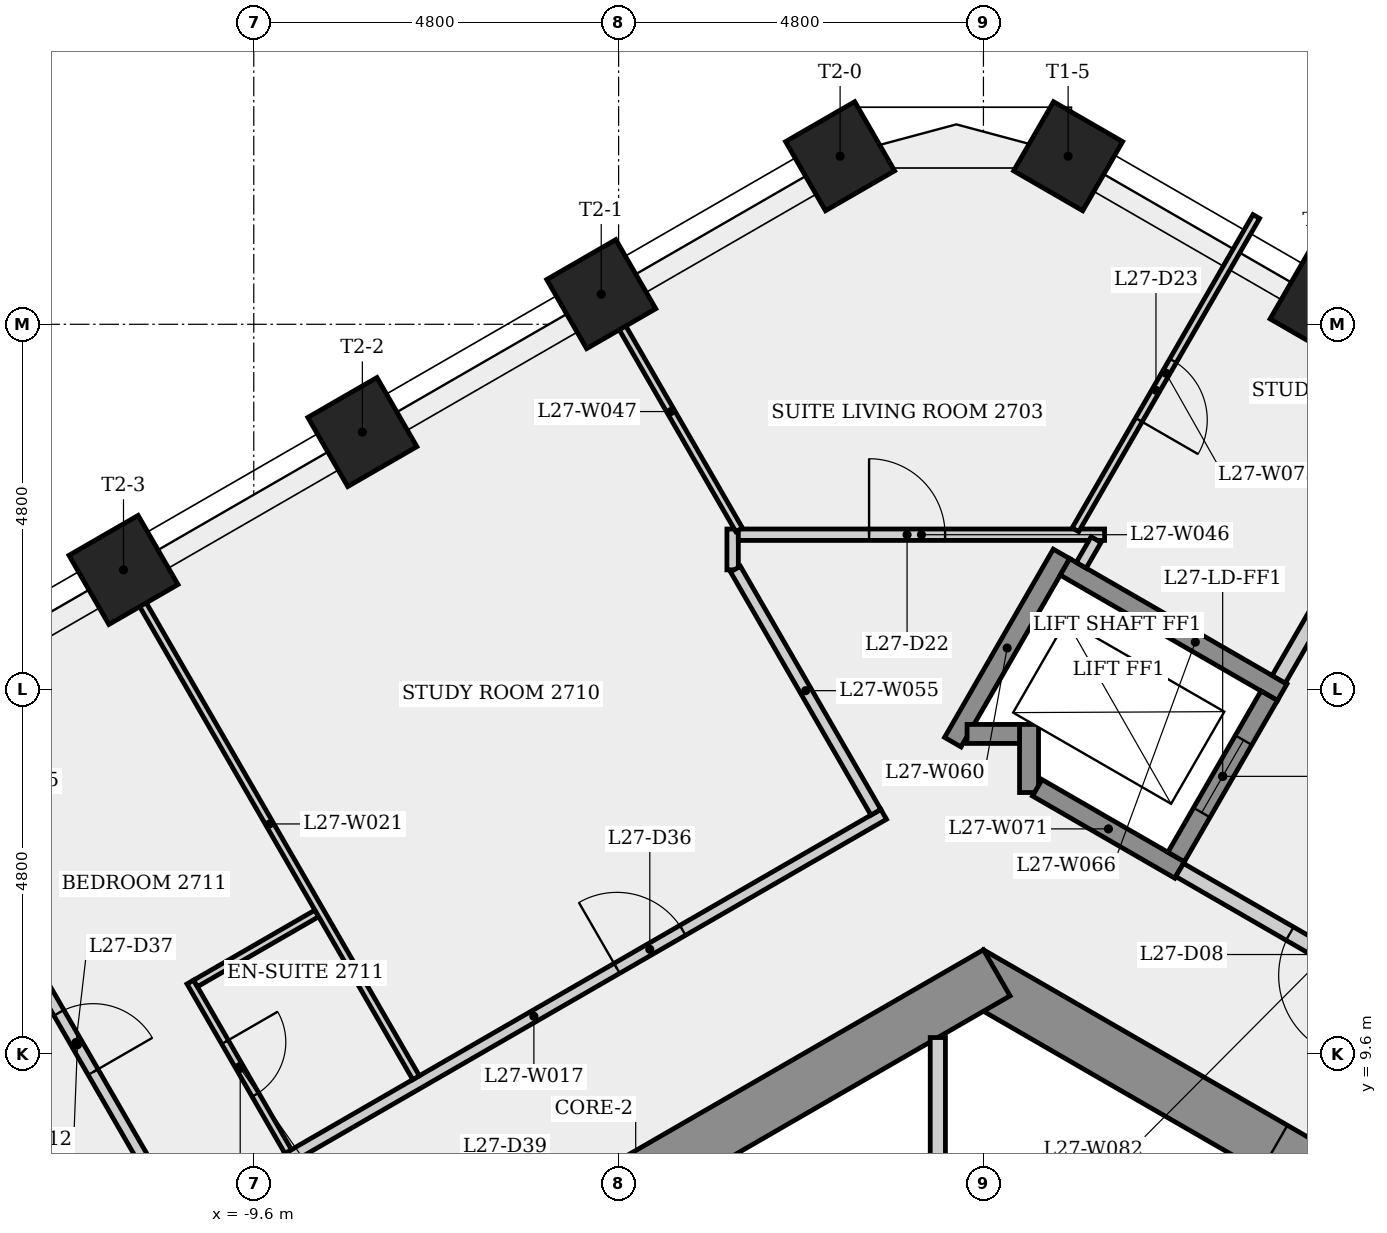
"""IFC4 building model, lengths in metres.
Left out: names, types, materials, properties, quantities, classifications, styles, units other than length and angle.
Written with IfcOpenShell. Run it as: python <this file> out.ifc"""

import sys

from ifc_helpers import new_model, si_unit, direction, frame, frame_2d, origin, origin_2d, place, context, subcontext, project, spatial, rectangle, extrude, element, fill, save


model = new_model("IFC4")
c1 = context("Model", 3, precision=1e-05, world=origin(), true_north=direction((0.0, 1.0)))
c2 = subcontext(c1, "Body", "Model", "MODEL_VIEW")
j1 = project(units=[si_unit("LENGTHUNIT", "METRE"), si_unit("PLANEANGLEUNIT", "RADIAN")], contexts=[c1])
p1 = place(None, origin())
s1 = spatial("IfcSite", under=j1, at=p1, CompositionType="ELEMENT")
p2 = place(p1, origin())
s2 = spatial("IfcBuilding", under=s1, at=p2, CompositionType="ELEMENT")
p3 = place(p2, frame((0.0, 0.0, 103.5)))
s3 = spatial("IfcBuildingStorey", under=s2, at=p3, CompositionType="ELEMENT", Elevation=103.5)
p4 = place(p3, frame((9.325, 5.182, 0.0), z_axis=(0.0, 0.0, 1.0), x_axis=(-0.866023993627, 0.500002442456, 0.0)))
e1 = element("IfcWall", 1, at=p4, inside=s3, PredefinedType="SHEAR", context=c2, shape_type="SweptSolid", body=[
    extrude(rectangle(XDim=10.97, YDim=0.7, at=frame_2d((5.485, 0.0))), origin(), (0.0, 0.0, 1.0), 3.4),
])
p5 = place(p4, frame((5.451, 0.0, 0.0)))
e2 = element("IfcOpeningElement", 2, at=p5, cuts=e1, PredefinedType="OPENING", context=c2, shape_type="SweptSolid", body=[
    extrude(rectangle(XDim=0.9, YDim=2.1, at=frame_2d((0.45, 1.05))), frame((0.0, 0.36, 0.0), z_axis=(0.0, -1.0, 0.0), x_axis=(1.0, 0.0, 0.0)), (0.0, 0.0, 1.0), 0.72),
])
p6 = place(p3, frame((0.175, 10.667, 0.0), z_axis=(0.0, 0.0, 1.0), x_axis=(-0.866023993627, -0.500002442456, 0.0)))
e3 = element("IfcWall", 3, at=p6, inside=s3, PredefinedType="SHEAR", context=c2, shape_type="SweptSolid", body=[
    extrude(rectangle(XDim=10.97, YDim=0.7, at=frame_2d((5.485, 0.0))), origin(), (0.0, 0.0, 1.0), 3.4),
])
p7 = place(p6, frame((7.021, 0.0, 0.0)))
e4 = element("IfcOpeningElement", 4, at=p7, cuts=e3, PredefinedType="OPENING", context=c2, shape_type="SweptSolid", body=[
    extrude(rectangle(XDim=0.9, YDim=2.1, at=frame_2d((0.45, 1.05))), frame((0.0, 0.36, 0.0), z_axis=(0.0, -1.0, 0.0), x_axis=(1.0, 0.0, 0.0)), (0.0, 0.0, 1.0), 0.72),
])
for number, where, z_axis, x_axis in (
    (5, (4.489, 19.463, 0.0), (0.0, 0.0, 1.0), (0.5, 0.866, 0.0)),
    (6, (1.114, 21.411, 0.0), (0.0, 0.0, 1.0), (0.5, 0.866, 0.0)),
    (7, (-1.886, 21.411, 0.0), (0.0, 0.0, 1.0), (-0.5, 0.866, 0.0)),
    (8, (-5.029, 19.597, 0.0), (0.0, 0.0, 1.0), (-0.5, 0.866, 0.0)),
    (9, (-8.171, 17.782, 0.0), (0.0, 0.0, 1.0), (-0.5, 0.866, 0.0)),
    (10, (-11.314, 15.968, 0.0), (0.0, 0.0, 1.0), (-0.5, 0.866, 0.0)),
):
    element("IfcColumn", number, at=place(p3, frame(where, z_axis=z_axis, x_axis=x_axis)), inside=s3, PredefinedType="COLUMN", context=c2, shape_type="SweptSolid", body=[
        extrude(rectangle(XDim=1.05, YDim=1.05, at=origin_2d()), origin(), (0.0, 0.0, 1.0), 3.4),
    ])
p8 = place(p3, frame((-13.296, 12.101, 0.0), z_axis=(0.0, 0.0, 1.0), x_axis=(0.499984873778, -0.866034136737, 0.0)))
e11 = element("IfcWall", 11, at=p8, inside=s3, PredefinedType="PARTITIONING", context=c2, shape_type="SweptSolid", body=[
    extrude(rectangle(XDim=5.503, YDim=0.15, at=frame_2d((2.751, 0.0))), origin(), (0.0, 0.0, 1.0), 3.05),
])
p9 = place(p8, frame((2.264, 0.0, 0.0)))
e12 = element("IfcOpeningElement", 12, at=p9, cuts=e11, PredefinedType="OPENING", context=c2, shape_type="SweptSolid", body=[
    extrude(rectangle(XDim=0.9, YDim=2.1, at=frame_2d((0.45, 1.05))), frame((0.0, 0.085, 0.0), z_axis=(0.0, -1.0, 0.0), x_axis=(1.0, 0.0, 0.0)), (0.0, 0.0, 1.0), 0.17),
])
p10 = place(p3, frame((-10.517, 7.438, 0.0), z_axis=(0.0, 0.0, 1.0), x_axis=(0.866032192358, 0.499988241661, 0.0)))
e13 = element("IfcWall", 13, at=p10, inside=s3, PredefinedType="PARTITIONING", context=c2, shape_type="SweptSolid", body=[
    extrude(rectangle(XDim=10.628, YDim=0.15, at=frame_2d((5.314, 0.0))), origin(), (0.0, 0.0, 1.0), 3.05),
])
p11 = place(p10, frame((6.575, 0.0, 0.0)))
e14 = element("IfcOpeningElement", 14, at=p11, cuts=e13, PredefinedType="OPENING", context=c2, shape_type="SweptSolid", body=[
    extrude(rectangle(XDim=1.0, YDim=2.1, at=frame_2d((0.5, 1.05))), frame((0.0, 0.085, 0.0), z_axis=(0.0, -1.0, 0.0), x_axis=(1.0, 0.0, 0.0)), (0.0, 0.0, 1.0), 0.17),
])
p12 = place(p3, frame((-10.435, 10.545, 0.0), z_axis=(0.0, 0.0, 1.0), x_axis=(0.500034319456, -0.866005588531, 0.0)))
e15 = element("IfcWall", 15, at=p12, inside=s3, PredefinedType="PARTITIONING", context=c2, shape_type="SweptSolid", body=[
    extrude(rectangle(XDim=2.575, YDim=0.1, at=frame_2d((1.288, 0.0))), origin(), (0.0, 0.0, 1.0), 3.05),
])
p13 = place(p12, frame((0.913, 0.0, 0.0)))
e16 = element("IfcOpeningElement", 16, at=p13, cuts=e15, PredefinedType="OPENING", context=c2, shape_type="SweptSolid", body=[
    extrude(rectangle(XDim=0.8, YDim=2.1, at=frame_2d((0.4, 1.05))), frame((0.0, 0.06, 0.0), z_axis=(0.0, -1.0, 0.0), x_axis=(1.0, 0.0, 0.0)), (0.0, 0.0, 1.0), 0.12),
])
p14 = place(p3, frame((-8.771, 11.448, 0.0), z_axis=(0.0, 0.0, 1.0), x_axis=(-0.866033360935, -0.499986217557, 0.0)))
e17 = element("IfcWall", 17, at=p14, inside=s3, PredefinedType="PARTITIONING", context=c2, shape_type="SweptSolid", body=[
    extrude(rectangle(XDim=1.843, YDim=0.1, at=frame_2d((0.921, 0.0))), origin(), (0.0, 0.0, 1.0), 3.05),
])
p15 = place(p3, frame((-11.32, 15.964, 0.0), z_axis=(0.0, 0.0, 1.0), x_axis=(0.499997453958, -0.866026873738, 0.0)))
e18 = element("IfcWall", 18, at=p15, inside=s3, PredefinedType="PARTITIONING", context=c2, shape_type="SweptSolid", body=[
    extrude(rectangle(XDim=7.71, YDim=0.1, at=frame_2d((3.855, 0.0))), origin(), (0.0, 0.0, 1.0), 3.05),
])
p16 = place(p3, frame((-3.3, 15.969, 0.0), z_axis=(0.0, 0.0, 1.0), x_axis=(0.0, 1.0, 0.0)))
e19 = element("IfcWall", 19, at=p16, inside=s3, PredefinedType="PARTITIONING", context=c2, shape_type="SweptSolid", body=[
    extrude(rectangle(XDim=0.537, YDim=0.15, at=frame_2d((0.269, 0.0))), origin(), (0.0, 0.0, 1.0), 3.05),
])
p17 = place(p3, frame((-3.225, 16.431, 0.0), z_axis=(0.0, 0.0, 1.0), x_axis=(1.0, 0.0, 0.0)))
e20 = element("IfcWall", 20, at=p17, inside=s3, PredefinedType="PARTITIONING", context=c2, shape_type="SweptSolid", body=[
    extrude(rectangle(XDim=4.819, YDim=0.15, at=frame_2d((2.41, 0.0))), origin(), (0.0, 0.0, 1.0), 3.05),
])
p18 = place(p17, frame((1.72, 0.0, 0.0)))
e21 = element("IfcOpeningElement", 21, at=p18, cuts=e20, PredefinedType="OPENING", context=c2, shape_type="SweptSolid", body=[
    extrude(rectangle(XDim=1.0, YDim=2.1, at=frame_2d((0.5, 1.05))), frame((0.0, 0.085, 0.0), z_axis=(0.0, -1.0, 0.0), x_axis=(1.0, 0.0, 0.0)), (0.0, 0.0, 1.0), 0.17),
])
p19 = place(p3, frame((-3.215, 16.496, 0.0), z_axis=(0.0, 0.0, 1.0), x_axis=(-0.499998991654, 0.866025985952, 0.0)))
e22 = element("IfcWall", 22, at=p19, inside=s3, PredefinedType="PARTITIONING", context=c2, shape_type="SweptSolid", body=[
    extrude(rectangle(XDim=3.592, YDim=0.1, at=frame_2d((1.796, 0.0))), origin(), (0.0, 0.0, 1.0), 3.05),
])
p20 = place(p3, frame((-1.415, 12.78, 0.0), z_axis=(0.0, 0.0, 1.0), x_axis=(-0.499991312689, 0.866030419348, 0.0)))
e23 = element("IfcWall", 23, at=p20, inside=s3, PredefinedType="PARTITIONING", context=c2, shape_type="SweptSolid", body=[
    extrude(rectangle(XDim=3.694, YDim=0.15, at=frame_2d((1.847, 0.0))), origin(), (0.0, 0.0, 1.0), 3.05),
])
p21 = place(p3, frame((-0.6, 9.815, 0.0), z_axis=(0.0, 0.0, 1.0), x_axis=(0.0, -1.0, 0.0)))
e24 = element("IfcWall", 24, at=p21, inside=s3, PredefinedType="PARTITIONING", context=c2, shape_type="SweptSolid", body=[
    extrude(rectangle(XDim=4.54, YDim=0.2, at=frame_2d((2.27, 0.0))), origin(), (0.0, 0.0, 1.0), 3.05),
])
p22 = place(p3, frame((-0.403, 13.702, 0.0), z_axis=(0.0, 0.0, 1.0), x_axis=(0.499976111731, 0.866039195244, 0.0)))
e25 = element("IfcWall", 25, at=p22, inside=s3, PredefinedType="SHEAR", context=c2, shape_type="SweptSolid", body=[
    extrude(rectangle(XDim=2.861, YDim=0.25, at=frame_2d((1.43, 0.0))), origin(), (0.0, 0.0, 1.0), 3.05),
])
p23 = place(p3, frame((0.6, 13.039, 0.0), z_axis=(0.0, 0.0, 1.0), x_axis=(0.0, 1.0, 0.0)))
e26 = element("IfcWall", 26, at=p23, inside=s3, PredefinedType="SHEAR", context=c2, shape_type="SweptSolid", body=[
    extrude(rectangle(XDim=0.896, YDim=0.25, at=frame_2d((0.448, 0.0))), origin(), (0.0, 0.0, 1.0), 3.05),
])
p24 = place(p3, frame((0.475, 13.81, 0.0), z_axis=(0.0, 0.0, 1.0), x_axis=(-1.0, 0.0, 0.0)))
e27 = element("IfcWall", 27, at=p24, inside=s3, PredefinedType="SHEAR", context=c2, shape_type="SweptSolid", body=[
    extrude(rectangle(XDim=0.691, YDim=0.25, at=frame_2d((0.345, 0.0))), origin(), (0.0, 0.0, 1.0), 3.4),
])
p25 = place(p3, frame((1.073, 16.008, 0.0), z_axis=(0.0, 0.0, 1.0), x_axis=(0.866040211805, -0.499974350878, 0.0)))
e28 = element("IfcWall", 28, at=p25, inside=s3, PredefinedType="SHEAR", context=c2, shape_type="SweptSolid", body=[
    extrude(rectangle(XDim=3.3, YDim=0.25, at=frame_2d((1.65, 0.0))), origin(), (0.0, 0.0, 1.0), 3.05),
])
p26 = place(p3, frame((1.482, 16.366, 0.0), z_axis=(0.0, 0.0, 1.0), x_axis=(-0.500047902311, -0.865997745606, 0.0)))
e29 = element("IfcWall", 29, at=p26, inside=s3, PredefinedType="PARTITIONING", context=c2, shape_type="SweptSolid", body=[
    extrude(rectangle(XDim=0.39, YDim=0.15, at=frame_2d((0.195, 0.0))), origin(), (0.0, 0.0, 1.0), 3.05),
])
p27 = place(p3, frame((2.581, 12.02, 0.0), z_axis=(0.0, 0.0, 1.0), x_axis=(-0.86603892542, 0.499976579108, 0.0)))
e30 = element("IfcWall", 30, at=p27, inside=s3, PredefinedType="SHEAR", context=c2, shape_type="SweptSolid", body=[
    extrude(rectangle(XDim=2.162, YDim=0.25, at=frame_2d((1.081, 0.0))), origin(), (0.0, 0.0, 1.0), 3.05),
])
p28 = place(p3, frame((2.535, 12.191, 0.0), z_axis=(0.0, 0.0, 1.0), x_axis=(0.500061746146, 0.865989751695, 0.0)))
e31 = element("IfcWall", 31, at=p28, inside=s3, PredefinedType="SHEAR", context=c2, shape_type="SweptSolid", body=[
    extrude(rectangle(XDim=2.45, YDim=0.25, at=frame_2d((1.225, 0.0))), origin(), (0.0, 0.0, 1.0), 3.4),
])
p29 = place(p28, frame((0.675, 0.0, 0.0)))
e32 = element("IfcOpeningElement", 32, at=p29, cuts=e31, PredefinedType="OPENING", context=c2, shape_type="SweptSolid", body=[
    extrude(rectangle(XDim=1.1, YDim=2.1, at=frame_2d((0.55, 1.05))), frame((0.0, 0.135, 0.0), z_axis=(0.0, -1.0, 0.0), x_axis=(1.0, 0.0, 0.0)), (0.0, 0.0, 1.0), 0.27),
])
p30 = place(p3, frame((3.59, 20.618, 0.0), z_axis=(0.0, 0.0, 1.0), x_axis=(-0.500006646563, -0.866021566356, 0.0)))
e33 = element("IfcWall", 33, at=p30, inside=s3, PredefinedType="PARTITIONING", context=c2, shape_type="SweptSolid", body=[
    extrude(rectangle(XDim=4.759, YDim=0.1, at=frame_2d((2.38, 0.0))), origin(), (0.0, 0.0, 1.0), 3.05),
])
p31 = place(p30, frame((2.19, 0.0, 0.0)))
e34 = element("IfcOpeningElement", 34, at=p31, cuts=e33, PredefinedType="OPENING", context=c2, shape_type="SweptSolid", body=[
    extrude(rectangle(XDim=0.9, YDim=2.1, at=frame_2d((0.45, 1.05))), frame((0.0, 0.06, 0.0), z_axis=(0.0, -1.0, 0.0), x_axis=(1.0, 0.0, 0.0)), (0.0, 0.0, 1.0), 0.12),
])
p32 = place(p3, frame((3.885, 14.529, 0.0), z_axis=(0.0, 0.0, 1.0), x_axis=(0.499997628298, 0.866026773083, 0.0)))
e35 = element("IfcWall", 35, at=p32, inside=s3, PredefinedType="PARTITIONING", context=c2, shape_type="SweptSolid", body=[
    extrude(rectangle(XDim=1.075, YDim=0.2, at=frame_2d((0.538, 0.0))), origin(), (0.0, 0.0, 1.0), 3.05),
])
p33 = place(p3, frame((6.435, 9.795, 0.0), z_axis=(0.0, 0.0, 1.0), x_axis=(-0.866012907634, 0.500021643343, 0.0)))
e36 = element("IfcWall", 36, at=p33, inside=s3, PredefinedType="PARTITIONING", context=c2, shape_type="SweptSolid", body=[
    extrude(rectangle(XDim=4.45, YDim=0.2, at=frame_2d((2.225, 0.0))), origin(), (0.0, 0.0, 1.0), 3.05),
])
p34 = place(p33, frame((1.675, 0.0, 0.0)))
e37 = element("IfcOpeningElement", 37, at=p34, cuts=e36, PredefinedType="OPENING", context=c2, shape_type="SweptSolid", body=[
    extrude(rectangle(XDim=1.1, YDim=2.1, at=frame_2d((0.55, 1.05))), frame((0.0, 0.11, 0.0), z_axis=(0.0, -1.0, 0.0), x_axis=(1.0, 0.0, 0.0)), (0.0, 0.0, 1.0), 0.22),
])
p35 = place(p34, origin())
e38 = element("IfcDoor", 38, at=p35, inside=s3, OperationType="SINGLE_SWING_LEFT", PredefinedType="DOOR", context=c2, shape_type="SweptSolid", body=[
    extrude(rectangle(XDim=1.1, YDim=2.1, at=frame_2d((0.55, 1.05))), frame((0.0, 0.025, 0.0), z_axis=(0.0, -1.0, 0.0), x_axis=(1.0, 0.0, 0.0)), (0.0, 0.0, 1.0), 0.05),
])
fill(e37, e38)
p36 = place(p29, origin())
e39 = element("IfcDoor", 39, at=p36, inside=s3, OperationType="SLIDING_TO_LEFT", PredefinedType="DOOR", context=c2, shape_type="SweptSolid", body=[
    extrude(rectangle(XDim=1.1, YDim=2.1, at=frame_2d((0.55, 1.05))), frame((0.0, 0.025, 0.0), z_axis=(0.0, -1.0, 0.0), x_axis=(1.0, 0.0, 0.0)), (0.0, 0.0, 1.0), 0.05),
])
fill(e32, e39)
p37 = place(p18, origin())
e40 = element("IfcDoor", 40, at=p37, inside=s3, OperationType="SINGLE_SWING_LEFT", PredefinedType="DOOR", context=c2, shape_type="SweptSolid", body=[
    extrude(rectangle(XDim=1.0, YDim=2.1, at=frame_2d((0.5, 1.05))), frame((0.0, 0.025, 0.0), z_axis=(0.0, -1.0, 0.0), x_axis=(1.0, 0.0, 0.0)), (0.0, 0.0, 1.0), 0.05),
])
fill(e21, e40)
p38 = place(p31, origin())
e41 = element("IfcDoor", 41, at=p38, inside=s3, OperationType="SINGLE_SWING_RIGHT", PredefinedType="DOOR", context=c2, shape_type="SweptSolid", body=[
    extrude(rectangle(XDim=0.9, YDim=2.1, at=frame_2d((0.45, 1.05))), frame((0.0, 0.025, 0.0), z_axis=(0.0, -1.0, 0.0), x_axis=(1.0, 0.0, 0.0)), (0.0, 0.0, 1.0), 0.05),
])
fill(e34, e41)
p39 = place(p11, origin())
e42 = element("IfcDoor", 42, at=p39, inside=s3, OperationType="SINGLE_SWING_LEFT", PredefinedType="DOOR", context=c2, shape_type="SweptSolid", body=[
    extrude(rectangle(XDim=1.0, YDim=2.1, at=frame_2d((0.5, 1.05))), frame((0.0, 0.025, 0.0), z_axis=(0.0, -1.0, 0.0), x_axis=(1.0, 0.0, 0.0)), (0.0, 0.0, 1.0), 0.05),
])
fill(e14, e42)
p40 = place(p9, origin())
e43 = element("IfcDoor", 43, at=p40, inside=s3, OperationType="SINGLE_SWING_RIGHT", PredefinedType="DOOR", context=c2, shape_type="SweptSolid", body=[
    extrude(rectangle(XDim=0.9, YDim=2.1, at=frame_2d((0.45, 1.05))), frame((0.0, 0.025, 0.0), z_axis=(0.0, -1.0, 0.0), x_axis=(1.0, 0.0, 0.0)), (0.0, 0.0, 1.0), 0.05),
])
fill(e12, e43)
p41 = place(p13, origin())
e44 = element("IfcDoor", 44, at=p41, inside=s3, OperationType="SINGLE_SWING_LEFT", PredefinedType="DOOR", context=c2, shape_type="SweptSolid", body=[
    extrude(rectangle(XDim=0.8, YDim=2.1, at=frame_2d((0.4, 1.05))), frame((0.0, 0.025, 0.0), z_axis=(0.0, -1.0, 0.0), x_axis=(1.0, 0.0, 0.0)), (0.0, 0.0, 1.0), 0.05),
])
fill(e16, e44)
p42 = place(p5, origin())
e45 = element("IfcDoor", 45, at=p42, inside=s3, OperationType="SINGLE_SWING_LEFT", PredefinedType="DOOR", context=c2, shape_type="SweptSolid", body=[
    extrude(rectangle(XDim=0.9, YDim=2.1, at=frame_2d((0.45, 1.05))), frame((0.0, 0.025, 0.0), z_axis=(0.0, -1.0, 0.0), x_axis=(1.0, 0.0, 0.0)), (0.0, 0.0, 1.0), 0.05),
])
fill(e2, e45)
save(model, sys.argv[1])
